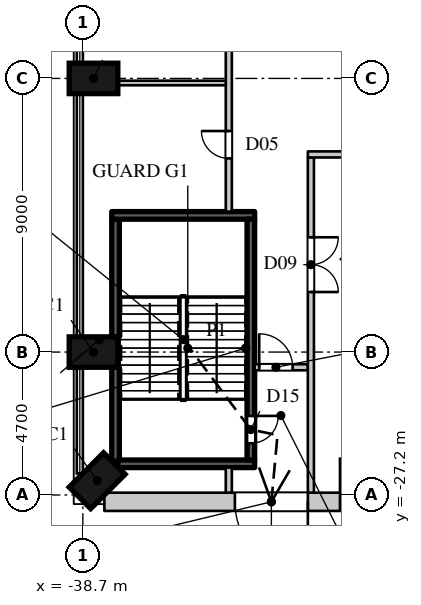
"""IFC4 building model, lengths in metres.
Left out: names, types, materials, properties, quantities, classifications, styles, units other than length and angle.
Written with IfcOpenShell. Run it as: python <this file> out.ifc"""

import sys

from ifc_helpers import new_model, si_unit, direction, frame, frame_2d, origin, origin_2d, place, context, subcontext, project, spatial, rectangle, extrude, element, fill, save


model = new_model("IFC4")
c1 = context("Model", 3, precision=1e-05, world=origin(), true_north=direction((0.0, 1.0)))
c2 = subcontext(c1, "Body", "Model", "MODEL_VIEW")
j1 = project(units=[si_unit("LENGTHUNIT", "METRE"), si_unit("PLANEANGLEUNIT", "RADIAN")], contexts=[c1])
p1 = place(None, origin())
s1 = spatial("IfcSite", under=j1, at=p1, CompositionType="ELEMENT")
p2 = place(p1, origin())
s2 = spatial("IfcBuilding", under=s1, at=p2, CompositionType="ELEMENT")
p3 = place(p2, origin())
s3 = spatial("IfcBuildingStorey", under=s2, at=p3, CompositionType="ELEMENT", Elevation=0.0)
for number, where, z_axis, x_axis in (
    (1, (-38.231, -26.731, 0.0), (0.0, 0.0, 1.0), (0.707, -0.707, 0.0)),
    (2, (-38.35, -13.5, 0.0), (0.0, 0.0, 1.0), (0.0, -1.0, 0.0)),
    (3, (-38.35, -22.5, 0.0), (0.0, 0.0, 1.0), (0.0, -1.0, 0.0)),
):
    element("IfcColumn", number, at=place(p3, frame(where, z_axis=z_axis, x_axis=x_axis)), inside=s3, PredefinedType="COLUMN", context=c2, shape_type="SweptSolid", body=[
        extrude(rectangle(XDim=1.0, YDim=1.6, at=origin_2d()), origin(), (0.0, 0.0, 1.0), 9.0),
    ])
p4 = place(p3, frame((-30.2, -27.425, 0.0), z_axis=(0.0, 0.0, 1.0), x_axis=(-1.0, 0.0, 0.0)))
e4 = element("IfcWall", 4, at=p4, inside=s3, PredefinedType="ELEMENTEDWALL", context=c2, shape_type="SweptSolid", body=[
    extrude(rectangle(XDim=7.793, YDim=0.6, at=frame_2d((3.896, 0.0))), origin(), (0.0, 0.0, 1.0), 8.6),
])
p5 = place(p4, frame((1.1, 0.0, 0.0)))
e5 = element("IfcOpeningElement", 5, at=p5, cuts=e4, PredefinedType="OPENING", context=c2, shape_type="SweptSolid", body=[
    extrude(rectangle(XDim=2.4, YDim=3.0, at=frame_2d((1.2, 1.5))), frame((0.0, 0.31, 0.0), z_axis=(0.0, -1.0, 0.0), x_axis=(1.0, 0.0, 0.0)), (0.0, 0.0, 1.0), 0.62),
])
p6 = place(p3, frame((-33.9, -27.125, 0.0), z_axis=(0.0, 0.0, 1.0), x_axis=(0.0, 1.0, 0.0)))
e6 = element("IfcWall", 6, at=p6, inside=s3, PredefinedType="PARTITIONING", context=c2, shape_type="SweptSolid", body=[
    extrude(rectangle(XDim=0.825, YDim=0.2, at=frame_2d((0.413, 0.0))), origin(), (0.0, 0.0, 1.0), 8.598),
])
p7 = place(p3, frame((-33.9, -17.88, 0.0), z_axis=(0.0, 0.0, 1.0), x_axis=(0.0, 1.0, 0.0)))
e7 = element("IfcWall", 7, at=p7, inside=s3, PredefinedType="PARTITIONING", context=c2, shape_type="SweptSolid", body=[
    extrude(rectangle(XDim=35.76, YDim=0.2, at=frame_2d((17.88, 0.0))), origin(), (0.0, 0.0, 1.0), 8.598),
])
p8 = place(p7, frame((1.75, 0.0, 0.0)))
e8 = element("IfcOpeningElement", 8, at=p8, cuts=e7, PredefinedType="OPENING", context=c2, shape_type="SweptSolid", body=[
    extrude(rectangle(XDim=0.9, YDim=2.2, at=frame_2d((0.45, 1.1))), frame((0.0, 0.11, 0.0), z_axis=(0.0, -1.0, 0.0), x_axis=(1.0, 0.0, 0.0)), (0.0, 0.0, 1.0), 0.22),
])
p9 = place(p7, frame((6.05, 0.0, 0.0)))
e9 = element("IfcOpeningElement", 9, at=p9, cuts=e7, PredefinedType="OPENING", context=c2, shape_type="SweptSolid", body=[
    extrude(rectangle(XDim=0.9, YDim=2.2, at=frame_2d((0.45, 1.1))), frame((0.0, 0.11, 0.0), z_axis=(0.0, -1.0, 0.0), x_axis=(1.0, 0.0, 0.0)), (0.0, 0.0, 1.0), 0.22),
])
p10 = place(p7, frame((10.6, 0.0, 0.0)))
e10 = element("IfcOpeningElement", 10, at=p10, cuts=e7, PredefinedType="OPENING", context=c2, shape_type="SweptSolid", body=[
    extrude(rectangle(XDim=0.9, YDim=2.2, at=frame_2d((0.45, 1.1))), frame((0.0, 0.11, 0.0), z_axis=(0.0, -1.0, 0.0), x_axis=(1.0, 0.0, 0.0)), (0.0, 0.0, 1.0), 0.22),
])
p11 = place(p7, frame((15.15, 0.0, 0.0)))
e11 = element("IfcOpeningElement", 11, at=p11, cuts=e7, PredefinedType="OPENING", context=c2, shape_type="SweptSolid", body=[
    extrude(rectangle(XDim=0.9, YDim=2.2, at=frame_2d((0.45, 1.1))), frame((0.0, 0.11, 0.0), z_axis=(0.0, -1.0, 0.0), x_axis=(1.0, 0.0, 0.0)), (0.0, 0.0, 1.0), 0.22),
])
p12 = place(p7, frame((19.7, 0.0, 0.0)))
e12 = element("IfcOpeningElement", 12, at=p12, cuts=e7, PredefinedType="OPENING", context=c2, shape_type="SweptSolid", body=[
    extrude(rectangle(XDim=0.9, YDim=2.2, at=frame_2d((0.45, 1.1))), frame((0.0, 0.11, 0.0), z_axis=(0.0, -1.0, 0.0), x_axis=(1.0, 0.0, 0.0)), (0.0, 0.0, 1.0), 0.22),
])
p13 = place(p7, frame((24.25, 0.0, 0.0)))
e13 = element("IfcOpeningElement", 13, at=p13, cuts=e7, PredefinedType="OPENING", context=c2, shape_type="SweptSolid", body=[
    extrude(rectangle(XDim=0.9, YDim=2.2, at=frame_2d((0.45, 1.1))), frame((0.0, 0.11, 0.0), z_axis=(0.0, -1.0, 0.0), x_axis=(1.0, 0.0, 0.0)), (0.0, 0.0, 1.0), 0.22),
])
p14 = place(p7, frame((28.8, 0.0, 0.0)))
e14 = element("IfcOpeningElement", 14, at=p14, cuts=e7, PredefinedType="OPENING", context=c2, shape_type="SweptSolid", body=[
    extrude(rectangle(XDim=0.9, YDim=2.2, at=frame_2d((0.45, 1.1))), frame((0.0, 0.11, 0.0), z_axis=(0.0, -1.0, 0.0), x_axis=(1.0, 0.0, 0.0)), (0.0, 0.0, 1.0), 0.22),
])
p15 = place(p7, frame((33.1, 0.0, 0.0)))
e15 = element("IfcOpeningElement", 15, at=p15, cuts=e7, PredefinedType="OPENING", context=c2, shape_type="SweptSolid", body=[
    extrude(rectangle(XDim=0.9, YDim=2.2, at=frame_2d((0.45, 1.1))), frame((0.0, 0.11, 0.0), z_axis=(0.0, -1.0, 0.0), x_axis=(1.0, 0.0, 0.0)), (0.0, 0.0, 1.0), 0.22),
])
p16 = place(p3, frame((-33.05, -23.0, 0.0), z_axis=(0.0, 0.0, 1.0), x_axis=(1.0, 0.0, 0.0)))
e16 = element("IfcWall", 16, at=p16, inside=s3, PredefinedType="PARTITIONING", context=c2, shape_type="SweptSolid", body=[
    extrude(rectangle(XDim=1.75, YDim=0.2, at=frame_2d((0.875, 0.0))), origin(), (0.0, 0.0, 1.0), 8.598),
])
p17 = place(p16, frame((0.15, 0.0, 0.0)))
e17 = element("IfcOpeningElement", 17, at=p17, cuts=e16, PredefinedType="OPENING", context=c2, shape_type="SweptSolid", body=[
    extrude(rectangle(XDim=1.1, YDim=2.2, at=frame_2d((0.55, 1.1))), frame((0.0, 0.11, 0.0), z_axis=(0.0, -1.0, 0.0), x_axis=(1.0, 0.0, 0.0)), (0.0, 0.0, 1.0), 0.22),
])
p18 = place(p3, frame((-31.2, -27.125, 0.0), z_axis=(0.0, 0.0, 1.0), x_axis=(0.0, 1.0, 0.0)))
e18 = element("IfcWall", 18, at=p18, inside=s3, PredefinedType="PARTITIONING", context=c2, shape_type="SweptSolid", body=[
    extrude(rectangle(XDim=11.025, YDim=0.2, at=frame_2d((5.512, 0.0))), origin(), (0.0, 0.0, 1.0), 8.598),
])
p19 = place(p18, frame((6.6, 0.0, 0.0)))
e19 = element("IfcOpeningElement", 19, at=p19, cuts=e18, PredefinedType="OPENING", context=c2, shape_type="SweptSolid", body=[
    extrude(rectangle(XDim=1.8, YDim=2.4, at=frame_2d((0.9, 1.2))), frame((0.0, 0.11, 0.0), z_axis=(0.0, -1.0, 0.0), x_axis=(1.0, 0.0, 0.0)), (0.0, 0.0, 1.0), 0.22),
])
p20 = place(p3, frame((-31.3, -16.0, 0.0), z_axis=(0.0, 0.0, 1.0), x_axis=(1.0, 0.0, 0.0)))
e20 = element("IfcWall", 20, at=p20, inside=s3, PredefinedType="PARTITIONING", context=c2, shape_type="SweptSolid", body=[
    extrude(rectangle(XDim=1.27, YDim=0.2, at=frame_2d((0.635, 0.0))), origin(), (0.0, 0.0, 1.0), 8.598),
])
p21 = place(p3, frame((-37.55, -13.65, 0.0), z_axis=(0.0, 0.0, 1.0), x_axis=(1.0, 0.0, 0.0)))
e21 = element("IfcWall", 21, at=p21, inside=s3, PredefinedType="PARTITIONING", context=c2, shape_type="SweptSolid", body=[
    extrude(rectangle(XDim=3.55, YDim=0.15, at=frame_2d((1.775, 0.0))), origin(), (0.0, 0.0, 1.0), 8.598),
])
p22 = place(p3, frame((-37.625, -26.095, 0.0), z_axis=(0.0, 0.0, 1.0), x_axis=(0.0, 1.0, 0.0)))
e22 = element("IfcWall", 22, at=p22, inside=s3, PredefinedType="SHEAR", context=c2, shape_type="SweptSolid", body=[
    extrude(rectangle(XDim=3.095, YDim=0.25, at=frame_2d((1.548, 0.0))), origin(), (0.0, 0.0, 1.0), 8.6),
])
p23 = place(p3, frame((-37.625, -22.0, 0.0), z_axis=(0.0, 0.0, 1.0), x_axis=(0.0, 1.0, 0.0)))
e23 = element("IfcWall", 23, at=p23, inside=s3, PredefinedType="SHEAR", context=c2, shape_type="SweptSolid", body=[
    extrude(rectangle(XDim=3.87, YDim=0.25, at=frame_2d((1.935, 0.0))), origin(), (0.0, 0.0, 1.0), 8.6),
])
p24 = place(p3, frame((-37.545, -26.175, 0.0), z_axis=(0.0, 0.0, 1.0), x_axis=(1.0, 0.0, 0.0)))
e24 = element("IfcWall", 24, at=p24, inside=s3, PredefinedType="SHEAR", context=c2, shape_type="SweptSolid", body=[
    extrude(rectangle(XDim=4.495, YDim=0.25, at=frame_2d((2.248, 0.0))), origin(), (0.0, 0.0, 1.0), 8.6),
])
p25 = place(p3, frame((-37.75, -18.005, 0.0), z_axis=(0.0, 0.0, 1.0), x_axis=(1.0, 0.0, 0.0)))
e25 = element("IfcWall", 25, at=p25, inside=s3, PredefinedType="SHEAR", context=c2, shape_type="SweptSolid", body=[
    extrude(rectangle(XDim=4.7, YDim=0.25, at=frame_2d((2.35, 0.0))), origin(), (0.0, 0.0, 1.0), 8.6),
])
p26 = place(p3, frame((-33.175, -26.05, 0.0), z_axis=(0.0, 0.0, 1.0), x_axis=(0.0, 1.0, 0.0)))
e26 = element("IfcWall", 26, at=p26, inside=s3, PredefinedType="SHEAR", context=c2, shape_type="SweptSolid", body=[
    extrude(rectangle(XDim=7.92, YDim=0.25, at=frame_2d((3.96, 0.0))), origin(), (0.0, 0.0, 1.0), 8.6),
])
p27 = place(p26, frame((0.55, 0.0, 0.0)))
e27 = element("IfcOpeningElement", 27, at=p27, cuts=e26, PredefinedType="OPENING", context=c2, shape_type="SweptSolid", body=[
    extrude(rectangle(XDim=0.9, YDim=2.2, at=frame_2d((0.45, 1.1))), frame((0.0, 0.135, 0.0), z_axis=(0.0, -1.0, 0.0), x_axis=(1.0, 0.0, 0.0)), (0.0, 0.0, 1.0), 0.27),
])
p28 = place(p5, origin())
e28 = element("IfcDoor", 28, at=p28, inside=s3, OperationType="DOUBLE_DOOR_SINGLE_SWING", PredefinedType="DOOR", context=c2, shape_type="SweptSolid", body=[
    extrude(rectangle(XDim=2.4, YDim=3.0, at=frame_2d((1.2, 1.5))), frame((0.0, -0.05, 0.0), z_axis=(0.0, -1.0, 0.0), x_axis=(1.0, 0.0, 0.0)), (0.0, 0.0, 1.0), 0.05),
])
fill(e5, e28)
p29 = place(p8, origin())
e29 = element("IfcDoor", 29, at=p29, inside=s3, OperationType="SINGLE_SWING_RIGHT", PredefinedType="DOOR", context=c2, shape_type="SweptSolid", body=[
    extrude(rectangle(XDim=0.9, YDim=2.2, at=frame_2d((0.45, 1.1))), frame((0.0, 0.025, 0.0), z_axis=(0.0, -1.0, 0.0), x_axis=(1.0, 0.0, 0.0)), (0.0, 0.0, 1.0), 0.05),
])
fill(e8, e29)
p30 = place(p19, origin())
e30 = element("IfcDoor", 30, at=p30, inside=s3, OperationType="DOUBLE_DOOR_SINGLE_SWING", PredefinedType="DOOR", context=c2, shape_type="SweptSolid", body=[
    extrude(rectangle(XDim=1.8, YDim=2.4, at=frame_2d((0.9, 1.2))), frame((0.0, 0.025, 0.0), z_axis=(0.0, -1.0, 0.0), x_axis=(1.0, 0.0, 0.0)), (0.0, 0.0, 1.0), 0.05),
])
fill(e19, e30)
p31 = place(p17, origin())
e31 = element("IfcDoor", 31, at=p31, inside=s3, OperationType="SINGLE_SWING_LEFT", PredefinedType="DOOR", context=c2, shape_type="SweptSolid", body=[
    extrude(rectangle(XDim=1.1, YDim=2.2, at=frame_2d((0.55, 1.1))), frame((0.0, 0.025, 0.0), z_axis=(0.0, -1.0, 0.0), x_axis=(1.0, 0.0, 0.0)), (0.0, 0.0, 1.0), 0.05),
])
fill(e17, e31)
p32 = place(p27, origin())
e32 = element("IfcDoor", 32, at=p32, inside=s3, OperationType="SINGLE_SWING_LEFT", PredefinedType="DOOR", context=c2, shape_type="SweptSolid", body=[
    extrude(rectangle(XDim=0.9, YDim=2.2, at=frame_2d((0.45, 1.1))), frame((0.0, 0.025, 0.0), z_axis=(0.0, -1.0, 0.0), x_axis=(1.0, 0.0, 0.0)), (0.0, 0.0, 1.0), 0.05),
])
fill(e27, e32)
save(model, sys.argv[1])
